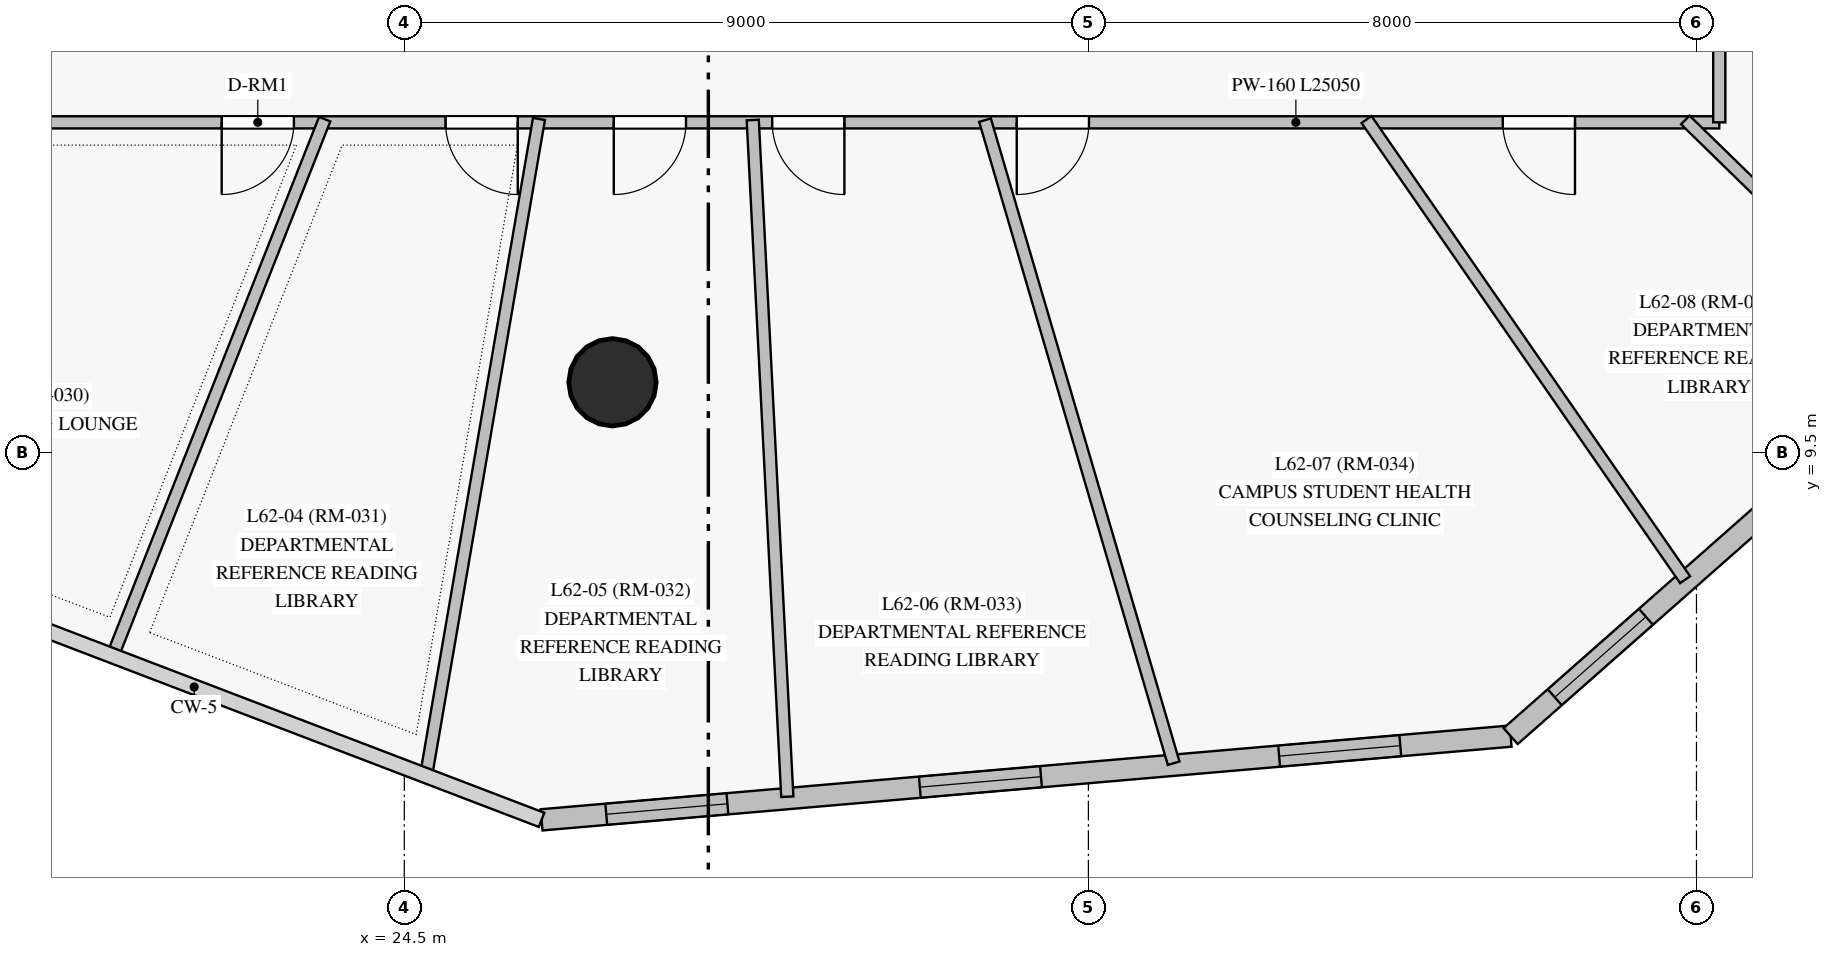
"""IFC4 building model, lengths in metres.
Left out: names, types, materials, properties, quantities, classifications, styles, units other than length and angle.
Written with IfcOpenShell. Run it as: python <this file> out.ifc"""

import sys

from ifc_helpers import new_model, si_unit, direction, frame, frame_2d, origin, origin_with_axes, origin_2d, place, context, subcontext, project, spatial, rectangle, circle, extrude, source, transform, mapped, element, fill, save


model = new_model("IFC4")
c1 = context("Model", 3, precision=1e-05, world=origin(), true_north=direction((0.0, 1.0)))
c2 = subcontext(c1, "Body", "Model", "MODEL_VIEW")
j1 = project(units=[si_unit("LENGTHUNIT", "METRE"), si_unit("PLANEANGLEUNIT", "RADIAN")], contexts=[c1])
p1 = place(None, origin())
s1 = spatial("IfcSite", under=j1, at=p1, CompositionType="ELEMENT")
p2 = place(p1, origin())
s2 = spatial("IfcBuilding", under=s1, at=p2, CompositionType="ELEMENT")
p3 = place(p2, frame((0.0, 0.0, 212.9)))
s3 = spatial("IfcBuildingStorey", under=s2, at=p3, CompositionType="ELEMENT", Elevation=212.9)
m1 = source(origin_with_axes(), c2, "Body", "SweptSolid", [
    extrude(circle(Radius=0.575, at=origin_2d()), origin(), (0.0, 0.0, 1.0), 4.0),
])
p4 = place(p3, frame((27.239, 10.43, 0.0), z_axis=(0.0, 0.0, 1.0), x_axis=(1.0, 0.0, 0.0)))
e1 = element("IfcColumn", 1, at=p4, inside=s3, PredefinedType="COLUMN", context=c2, shape_type="MappedRepresentation", body=[
    mapped(m1, transform((0.0, 0.0, 0.0), scale=1.0)),
])
p5 = place(p3, frame((26.306, 4.674, 0.0), z_axis=(0.0, 0.0, 1.0), x_axis=(0.996286620239, 0.086098608195, 0.0)))
e2 = element("IfcWall", 2, at=p5, inside=s3, PredefinedType="SOLIDWALL", context=c2, shape_type="SweptSolid", body=[
    extrude(rectangle(XDim=12.797, YDim=0.28, at=frame_2d((6.398, 0.0))), origin(), (0.0, 0.0, 1.0), 3.8),
])
p6 = place(p5, frame((0.854, 0.0, 0.85)))
e3 = element("IfcOpeningElement", 3, at=p6, cuts=e2, PredefinedType="OPENING", context=c2, shape_type="SweptSolid", body=[
    extrude(rectangle(XDim=1.6, YDim=1.6, at=frame_2d((0.8, 0.8))), frame((0.0, 0.15, 0.0), z_axis=(0.0, -1.0, 0.0), x_axis=(1.0, 0.0, 0.0)), (0.0, 0.0, 1.0), 0.3),
])
p7 = place(p5, frame((4.995, 0.0, 0.85)))
e4 = element("IfcOpeningElement", 4, at=p7, cuts=e2, PredefinedType="OPENING", context=c2, shape_type="SweptSolid", body=[
    extrude(rectangle(XDim=1.6, YDim=1.6, at=frame_2d((0.8, 0.8))), frame((0.0, 0.15, 0.0), z_axis=(0.0, -1.0, 0.0), x_axis=(1.0, 0.0, 0.0)), (0.0, 0.0, 1.0), 0.3),
])
p8 = place(p5, frame((9.74, 0.0, 0.85)))
e5 = element("IfcOpeningElement", 5, at=p8, cuts=e2, PredefinedType="OPENING", context=c2, shape_type="SweptSolid", body=[
    extrude(rectangle(XDim=1.6, YDim=1.6, at=frame_2d((0.8, 0.8))), frame((0.0, 0.15, 0.0), z_axis=(0.0, -1.0, 0.0), x_axis=(1.0, 0.0, 0.0)), (0.0, 0.0, 1.0), 0.3),
])
p9 = place(p3, frame((39.055, 5.775, 0.0), z_axis=(0.0, 0.0, 1.0), x_axis=(0.750017300643, 0.661418210164, 0.0)))
e6 = element("IfcWall", 6, at=p9, inside=s3, PredefinedType="SOLIDWALL", context=c2, shape_type="SweptSolid", body=[
    extrude(rectangle(XDim=9.766, YDim=0.28, at=frame_2d((4.883, 0.0))), origin(), (0.0, 0.0, 1.0), 3.8),
])
p10 = place(p9, frame((0.773, 0.0, 0.85)))
e7 = element("IfcOpeningElement", 7, at=p10, cuts=e6, PredefinedType="OPENING", context=c2, shape_type="SweptSolid", body=[
    extrude(rectangle(XDim=1.6, YDim=1.6, at=frame_2d((0.8, 0.8))), frame((0.0, 0.15, 0.0), z_axis=(0.0, -1.0, 0.0), x_axis=(1.0, 0.0, 0.0)), (0.0, 0.0, 1.0), 0.3),
])
p11 = place(p9, frame((4.455, 0.0, 0.85)))
e8 = element("IfcOpeningElement", 8, at=p11, cuts=e6, PredefinedType="OPENING", context=c2, shape_type="SweptSolid", body=[
    extrude(rectangle(XDim=1.6, YDim=1.6, at=frame_2d((0.8, 0.8))), frame((0.0, 0.15, 0.0), z_axis=(0.0, -1.0, 0.0), x_axis=(1.0, 0.0, 0.0)), (0.0, 0.0, 1.0), 0.3),
])
p12 = place(p9, frame((7.89, 0.0, 0.85)))
e9 = element("IfcOpeningElement", 9, at=p12, cuts=e6, PredefinedType="OPENING", context=c2, shape_type="SweptSolid", body=[
    extrude(rectangle(XDim=1.35, YDim=1.6, at=frame_2d((0.675, 0.8))), frame((0.0, 0.15, 0.0), z_axis=(0.0, -1.0, 0.0), x_axis=(1.0, 0.0, 0.0)), (0.0, 0.0, 1.0), 0.3),
])
p13 = place(p3, frame((41.8, 13.85, 0.0), z_axis=(0.0, 0.0, 1.0), x_axis=(-1.0, 0.0, 0.0)))
e10 = element("IfcWall", 10, at=p13, inside=s3, PredefinedType="PARTITIONING", context=c2, shape_type="SweptSolid", body=[
    extrude(rectangle(XDim=25.05, YDim=0.16, at=frame_2d((12.525, 0.0))), origin(), (0.0, 0.0, 1.0), 3.25),
])
p14 = place(p13, frame((18.752, 0.0, 0.0)))
e11 = element("IfcOpeningElement", 11, at=p14, cuts=e10, PredefinedType="OPENING", context=c2, shape_type="SweptSolid", body=[
    extrude(rectangle(XDim=0.95, YDim=2.15, at=frame_2d((0.475, 1.075))), frame((0.0, 0.09, 0.0), z_axis=(0.0, -1.0, 0.0), x_axis=(1.0, 0.0, 0.0)), (0.0, 0.0, 1.0), 0.18),
])
p15 = place(p13, frame((15.808, 0.0, 0.0)))
e12 = element("IfcOpeningElement", 12, at=p15, cuts=e10, PredefinedType="OPENING", context=c2, shape_type="SweptSolid", body=[
    extrude(rectangle(XDim=0.95, YDim=2.15, at=frame_2d((0.475, 1.075))), frame((0.0, 0.09, 0.0), z_axis=(0.0, -1.0, 0.0), x_axis=(1.0, 0.0, 0.0)), (0.0, 0.0, 1.0), 0.18),
])
p16 = place(p13, frame((13.594, 0.0, 0.0)))
e13 = element("IfcOpeningElement", 13, at=p16, cuts=e10, PredefinedType="OPENING", context=c2, shape_type="SweptSolid", body=[
    extrude(rectangle(XDim=0.95, YDim=2.15, at=frame_2d((0.475, 1.075))), frame((0.0, 0.09, 0.0), z_axis=(0.0, -1.0, 0.0), x_axis=(1.0, 0.0, 0.0)), (0.0, 0.0, 1.0), 0.18),
])
p17 = place(p13, frame((11.51, 0.0, 0.0)))
e14 = element("IfcOpeningElement", 14, at=p17, cuts=e10, PredefinedType="OPENING", context=c2, shape_type="SweptSolid", body=[
    extrude(rectangle(XDim=0.95, YDim=2.15, at=frame_2d((0.475, 1.075))), frame((0.0, 0.09, 0.0), z_axis=(0.0, -1.0, 0.0), x_axis=(1.0, 0.0, 0.0)), (0.0, 0.0, 1.0), 0.18),
])
p18 = place(p13, frame((8.292, 0.0, 0.0)))
e15 = element("IfcOpeningElement", 15, at=p18, cuts=e10, PredefinedType="OPENING", context=c2, shape_type="SweptSolid", body=[
    extrude(rectangle(XDim=0.95, YDim=2.15, at=frame_2d((0.475, 1.075))), frame((0.0, 0.09, 0.0), z_axis=(0.0, -1.0, 0.0), x_axis=(1.0, 0.0, 0.0)), (0.0, 0.0, 1.0), 0.18),
])
p19 = place(p13, frame((1.898, 0.0, 0.0)))
e16 = element("IfcOpeningElement", 16, at=p19, cuts=e10, PredefinedType="OPENING", context=c2, shape_type="SweptSolid", body=[
    extrude(rectangle(XDim=0.95, YDim=2.15, at=frame_2d((0.475, 1.075))), frame((0.0, 0.09, 0.0), z_axis=(0.0, -1.0, 0.0), x_axis=(1.0, 0.0, 0.0)), (0.0, 0.0, 1.0), 0.18),
])
p20 = place(p3, frame((41.8, 33.45, 0.0), z_axis=(0.0, 0.0, 1.0), x_axis=(0.0, -1.0, 0.0)))
e17 = element("IfcWall", 17, at=p20, inside=s3, PredefinedType="PARTITIONING", context=c2, shape_type="SweptSolid", body=[
    extrude(rectangle(XDim=19.6, YDim=0.16, at=frame_2d((9.8, 0.0))), origin(), (0.0, 0.0, 1.0), 3.25),
])
p21 = place(p20, frame((12.265, 0.0, 0.0)))
e18 = element("IfcOpeningElement", 18, at=p21, cuts=e17, PredefinedType="OPENING", context=c2, shape_type="SweptSolid", body=[
    extrude(rectangle(XDim=0.95, YDim=2.15, at=frame_2d((0.475, 1.075))), frame((0.0, 0.09, 0.0), z_axis=(0.0, -1.0, 0.0), x_axis=(1.0, 0.0, 0.0)), (0.0, 0.0, 1.0), 0.18),
])
p22 = place(p20, frame((9.325, 0.0, 0.0)))
e19 = element("IfcOpeningElement", 19, at=p22, cuts=e17, PredefinedType="OPENING", context=c2, shape_type="SweptSolid", body=[
    extrude(rectangle(XDim=0.95, YDim=2.15, at=frame_2d((0.475, 1.075))), frame((0.0, 0.09, 0.0), z_axis=(0.0, -1.0, 0.0), x_axis=(1.0, 0.0, 0.0)), (0.0, 0.0, 1.0), 0.18),
])
p23 = place(p20, frame((6.385, 0.0, 0.0)))
e20 = element("IfcOpeningElement", 20, at=p23, cuts=e17, PredefinedType="OPENING", context=c2, shape_type="SweptSolid", body=[
    extrude(rectangle(XDim=0.95, YDim=2.15, at=frame_2d((0.475, 1.075))), frame((0.0, 0.09, 0.0), z_axis=(0.0, -1.0, 0.0), x_axis=(1.0, 0.0, 0.0)), (0.0, 0.0, 1.0), 0.18),
])
p24 = place(p3, frame((29.084, 13.88, 0.0), z_axis=(0.0, 0.0, 1.0), x_axis=(0.051000407372, -0.998698632445, 0.0)))
e21 = element("IfcWall", 21, at=p24, inside=s3, PredefinedType="PARTITIONING", context=c2, shape_type="SweptSolid", body=[
    extrude(rectangle(XDim=8.914, YDim=0.16, at=frame_2d((4.457, 0.0))), origin(), (0.0, 0.0, 1.0), 3.8),
])
p25 = place(p3, frame((32.14, 13.879, 0.0), z_axis=(0.0, 0.0, 1.0), x_axis=(0.281469148603, -0.959570277981, 0.0)))
e22 = element("IfcWall", 22, at=p25, inside=s3, PredefinedType="PARTITIONING", context=c2, shape_type="SweptSolid", body=[
    extrude(rectangle(XDim=8.817, YDim=0.16, at=frame_2d((4.408, 0.0))), origin(), (0.0, 0.0, 1.0), 3.8),
])
p26 = place(p3, frame((26.271, 13.894, 0.0), z_axis=(0.0, 0.0, 1.0), x_axis=(-0.169452265017, -0.985538395944, 0.0)))
e23 = element("IfcWall", 23, at=p26, inside=s3, PredefinedType="PARTITIONING", context=c2, shape_type="SweptSolid", body=[
    extrude(rectangle(XDim=8.74, YDim=0.16, at=frame_2d((4.37, 0.0))), origin(), (0.0, 0.0, 1.0), 3.0),
])
p27 = place(p3, frame((23.453, 13.892, 0.0), z_axis=(0.0, 0.0, 1.0), x_axis=(-0.367560251881, -0.929999710342, 0.0)))
e24 = element("IfcWall", 24, at=p27, inside=s3, PredefinedType="PARTITIONING", context=c2, shape_type="SweptSolid", body=[
    extrude(rectangle(XDim=7.567, YDim=0.16, at=frame_2d((3.783, 0.0))), origin(), (0.0, 0.0, 1.0), 3.8),
])
p28 = place(p3, frame((37.159, 13.887, 0.0), z_axis=(0.0, 0.0, 1.0), x_axis=(0.569228944135, -0.822179061494, 0.0)))
e25 = element("IfcWall", 25, at=p28, inside=s3, PredefinedType="PARTITIONING", context=c2, shape_type="SweptSolid", body=[
    extrude(rectangle(XDim=7.363, YDim=0.16, at=frame_2d((3.682, 0.0))), origin(), (0.0, 0.0, 1.0), 3.8),
])
p29 = place(p3, frame((41.353, 13.881, 0.0), z_axis=(0.0, 0.0, 1.0), x_axis=(0.715908902614, -0.698193700314, 0.0)))
e26 = element("IfcWall", 26, at=p29, inside=s3, PredefinedType="PARTITIONING", context=c2, shape_type="SweptSolid", body=[
    extrude(rectangle(XDim=4.548, YDim=0.16, at=frame_2d((2.274, 0.0))), origin(), (0.0, 0.0, 1.0), 3.8),
])
m2 = source(origin_with_axes(), c2, "Body", "SweptSolid", [
    extrude(rectangle(XDim=1.6, YDim=1.6, at=frame_2d((0.8, 0.8))), frame((0.0, 0.03, 0.0), z_axis=(0.0, -1.0, 0.0), x_axis=(1.0, 0.0, 0.0)), (0.0, 0.0, 1.0), 0.06),
])
p30 = place(p6, origin())
e27 = element("IfcWindow", 27, at=p30, inside=s3, PartitioningType="SINGLE_PANEL", PredefinedType="WINDOW", context=c2, shape_type="MappedRepresentation", body=[
    mapped(m2, transform((0.0, 0.0, 0.0), scale=1.0)),
])
fill(e3, e27)
p31 = place(p7, origin())
e28 = element("IfcWindow", 28, at=p31, inside=s3, PartitioningType="SINGLE_PANEL", PredefinedType="WINDOW", context=c2, shape_type="MappedRepresentation", body=[
    mapped(m2, transform((0.0, 0.0, 0.0), scale=1.0)),
])
fill(e4, e28)
p32 = place(p8, origin())
e29 = element("IfcWindow", 29, at=p32, inside=s3, PartitioningType="SINGLE_PANEL", PredefinedType="WINDOW", context=c2, shape_type="MappedRepresentation", body=[
    mapped(m2, transform((0.0, 0.0, 0.0), scale=1.0)),
])
fill(e5, e29)
p33 = place(p10, origin())
e30 = element("IfcWindow", 30, at=p33, inside=s3, PartitioningType="SINGLE_PANEL", PredefinedType="WINDOW", context=c2, shape_type="MappedRepresentation", body=[
    mapped(m2, transform((0.0, 0.0, 0.0), scale=1.0)),
])
fill(e7, e30)
m3 = source(origin_with_axes(), c2, "Body", "SweptSolid", [
    extrude(rectangle(XDim=0.95, YDim=2.15, at=frame_2d((0.475, 1.075))), frame((0.0, 0.025, 0.0), z_axis=(0.0, -1.0, 0.0), x_axis=(1.0, 0.0, 0.0)), (0.0, 0.0, 1.0), 0.05),
])
p34 = place(p14, origin())
e31 = element("IfcDoor", 31, at=p34, inside=s3, OperationType="SINGLE_SWING_RIGHT", PredefinedType="DOOR", context=c2, shape_type="MappedRepresentation", body=[
    mapped(m3, transform((0.0, 0.0, 0.0), scale=1.0)),
])
fill(e11, e31)
p35 = place(p15, origin())
e32 = element("IfcDoor", 32, at=p35, inside=s3, OperationType="SINGLE_SWING_LEFT", PredefinedType="DOOR", context=c2, shape_type="MappedRepresentation", body=[
    mapped(m3, transform((0.0, 0.0, 0.0), scale=1.0)),
])
fill(e12, e32)
p36 = place(p16, origin())
e33 = element("IfcDoor", 33, at=p36, inside=s3, OperationType="SINGLE_SWING_RIGHT", PredefinedType="DOOR", context=c2, shape_type="MappedRepresentation", body=[
    mapped(m3, transform((0.0, 0.0, 0.0), scale=1.0)),
])
fill(e13, e33)
p37 = place(p17, origin())
e34 = element("IfcDoor", 34, at=p37, inside=s3, OperationType="SINGLE_SWING_LEFT", PredefinedType="DOOR", context=c2, shape_type="MappedRepresentation", body=[
    mapped(m3, transform((0.0, 0.0, 0.0), scale=1.0)),
])
fill(e14, e34)
p38 = place(p18, origin())
e35 = element("IfcDoor", 35, at=p38, inside=s3, OperationType="SINGLE_SWING_RIGHT", PredefinedType="DOOR", context=c2, shape_type="MappedRepresentation", body=[
    mapped(m3, transform((0.0, 0.0, 0.0), scale=1.0)),
])
fill(e15, e35)
p39 = place(p19, origin())
e36 = element("IfcDoor", 36, at=p39, inside=s3, OperationType="SINGLE_SWING_LEFT", PredefinedType="DOOR", context=c2, shape_type="MappedRepresentation", body=[
    mapped(m3, transform((0.0, 0.0, 0.0), scale=1.0)),
])
fill(e16, e36)
save(model, sys.argv[1])
